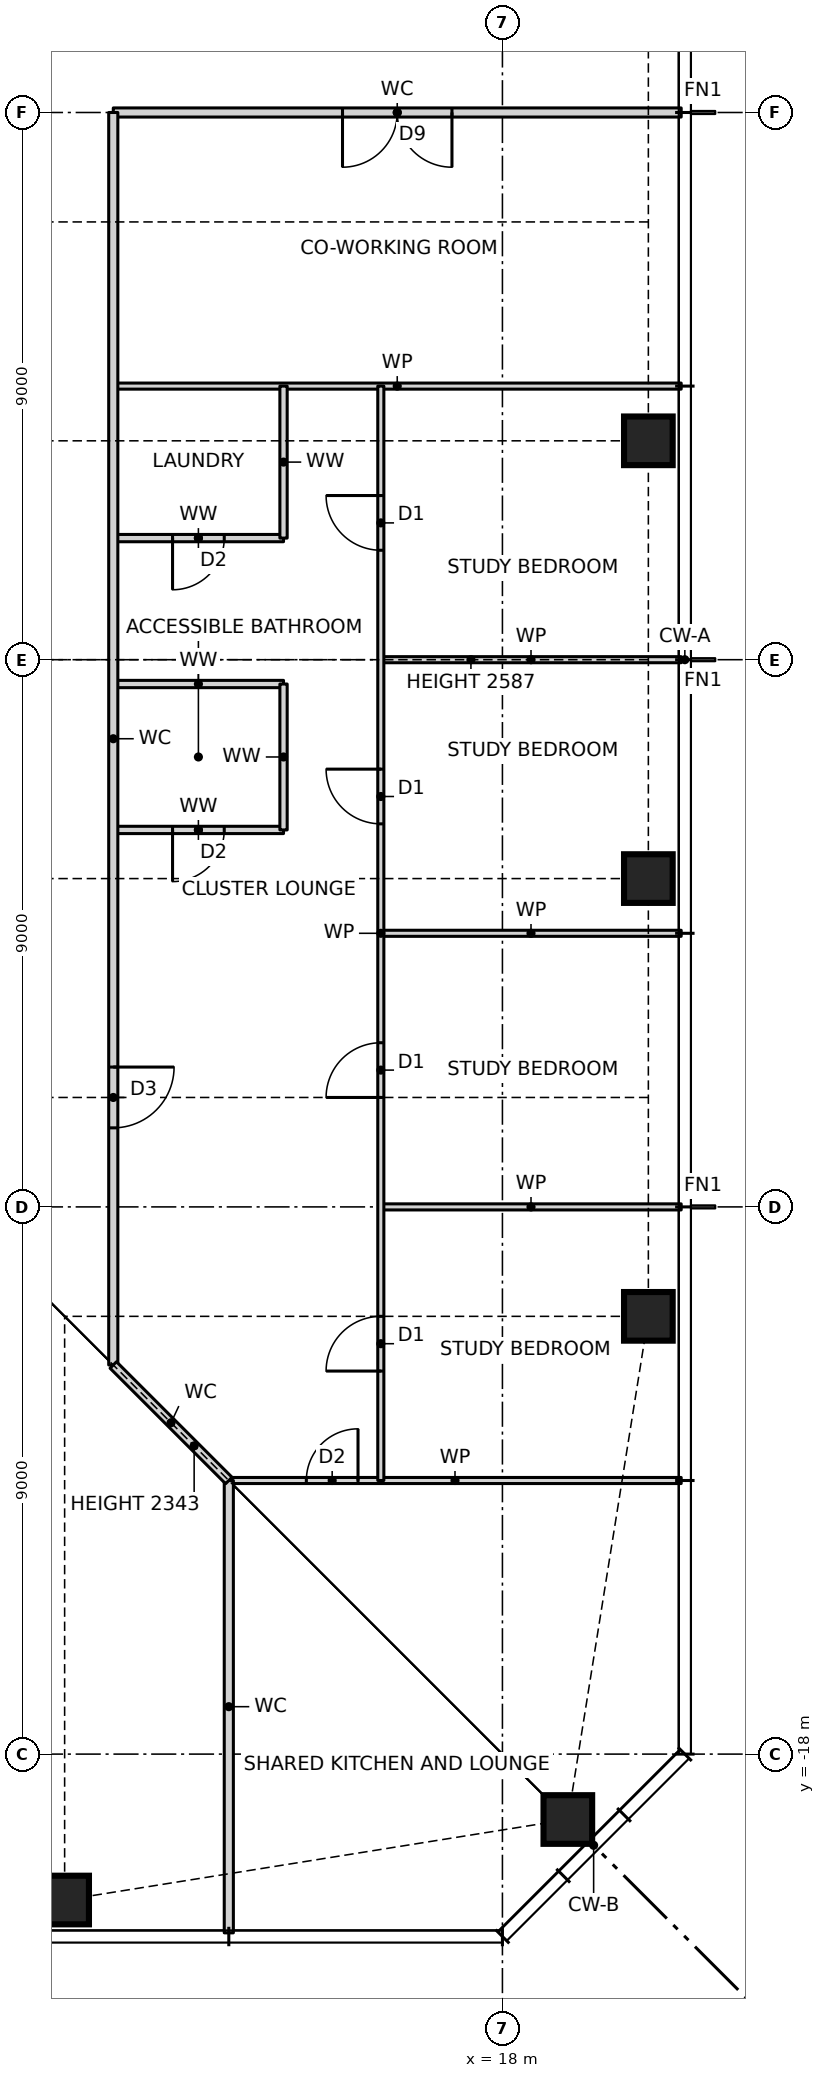
"""IFC4 building model, lengths in metres.
Left out: names, types, materials, properties, quantities, classifications, styles, units other than length and angle.
Written with IfcOpenShell. Run it as: python <this file> out.ifc"""

import sys

from ifc_helpers import new_model, si_unit, direction, frame, frame_2d, origin, origin_2d, place, context, subcontext, project, spatial, rectangle, hollow_rectangle, extrude, element, fill, save


model = new_model("IFC4")
c1 = context("Model", 3, precision=1e-05, world=origin(), true_north=direction((0.0, 1.0)))
c2 = subcontext(c1, "Body", "Model", "MODEL_VIEW")
j1 = project(units=[si_unit("LENGTHUNIT", "METRE"), si_unit("PLANEANGLEUNIT", "RADIAN")], contexts=[c1])
p1 = place(None, origin())
s1 = spatial("IfcSite", under=j1, at=p1, CompositionType="ELEMENT")
p2 = place(p1, origin())
s2 = spatial("IfcBuilding", under=s1, at=p2, CompositionType="ELEMENT")
p3 = place(p2, frame((0.0, 0.0, 115.5)))
s3 = spatial("IfcBuildingStorey", under=s2, at=p3, CompositionType="ELEMENT", Elevation=115.5)
for number, where, z_axis, x_axis in (
    (1, (10.8, -20.4, 0.0), (0.0, 0.0, 1.0), (1.0, 0.0, 0.0)),
    (2, (19.076, -19.076, 0.0), (0.0, 0.0, 1.0), (1.0, 0.0, 0.0)),
    (3, (20.4, -10.8, 0.0), (0.0, 0.0, 1.0), (1.0, 0.0, 0.0)),
    (4, (20.4, -3.6, 0.0), (0.0, 0.0, 1.0), (1.0, 0.0, 0.0)),
    (5, (20.4, 3.6, 0.0), (0.0, 0.0, 1.0), (1.0, 0.0, 0.0)),
):
    element("IfcColumn", number, at=place(p3, frame(where, z_axis=z_axis, x_axis=x_axis)), inside=s3, PredefinedType="COLUMN", context=c2, shape_type="SweptSolid", body=[
        extrude(hollow_rectangle(XDim=0.8, YDim=0.8, WallThickness=0.07, at=origin_2d()), origin(), (0.0, 0.0, 1.0), 3.5),
    ])
p4 = place(p3, frame((13.5, -13.5, 0.0), z_axis=(0.0, 0.0, 1.0), x_axis=(1.0, 0.0, 0.0)))
e6 = element("IfcWall", 6, at=p4, inside=s3, PredefinedType="PARTITIONING", context=c2, shape_type="SweptSolid", body=[
    extrude(rectangle(XDim=7.44, YDim=0.1, at=frame_2d((3.72, 0.0))), origin(), (0.0, 0.0, 1.0), 3.27),
])
p5 = place(p4, frame((1.275, 0.0, 0.0)))
e7 = element("IfcOpeningElement", 7, at=p5, cuts=e6, PredefinedType="OPENING", context=c2, shape_type="SweptSolid", body=[
    extrude(rectangle(XDim=0.85, YDim=2.1, at=frame_2d((0.425, 1.05))), frame((0.0, 0.06, 0.0), z_axis=(0.0, -1.0, 0.0), x_axis=(1.0, 0.0, 0.0)), (0.0, 0.0, 1.0), 0.12),
])
for number, where, z_axis, x_axis in (
    (8, (16.0, -9.0, 0.0), (0.0, 0.0, 1.0), (1.0, 0.0, 0.0)),
    (9, (16.0, -4.5, 0.0), (0.0, 0.0, 1.0), (1.0, 0.0, 0.0)),
):
    element("IfcWall", number, at=place(p3, frame(where, z_axis=z_axis, x_axis=x_axis)), inside=s3, PredefinedType="PARTITIONING", context=c2, shape_type="SweptSolid", body=[
        extrude(rectangle(XDim=4.94, YDim=0.1, at=frame_2d((2.47, 0.0))), origin(), (0.0, 0.0, 1.0), 3.27),
    ])
p6 = place(p3, frame((11.6, -2.8, 0.0), z_axis=(0.0, 0.0, 1.0), x_axis=(1.0, 0.0, 0.0)))
e10 = element("IfcWall", 10, at=p6, inside=s3, PredefinedType="PARTITIONING", context=c2, shape_type="SweptSolid", body=[
    extrude(rectangle(XDim=2.8, YDim=0.12, at=frame_2d((1.4, 0.0))), origin(), (0.0, 0.0, 1.0), 3.27),
])
p7 = place(p6, frame((0.975, 0.0, 0.0)))
e11 = element("IfcOpeningElement", 11, at=p7, cuts=e10, PredefinedType="OPENING", context=c2, shape_type="SweptSolid", body=[
    extrude(rectangle(XDim=0.85, YDim=2.1, at=frame_2d((0.425, 1.05))), frame((0.0, 0.07, 0.0), z_axis=(0.0, -1.0, 0.0), x_axis=(1.0, 0.0, 0.0)), (0.0, 0.0, 1.0), 0.14),
])
p8 = place(p3, frame((11.6, -0.4, 0.0), z_axis=(0.0, 0.0, 1.0), x_axis=(1.0, 0.0, 0.0)))
e12 = element("IfcWall", 12, at=p8, inside=s3, PredefinedType="PARTITIONING", context=c2, shape_type="SweptSolid", body=[
    extrude(rectangle(XDim=2.8, YDim=0.12, at=frame_2d((1.4, 0.0))), origin(), (0.0, 0.0, 1.0), 3.27),
])
p9 = place(p3, frame((16.0, 0.0, 0.0), z_axis=(0.0, 0.0, 1.0), x_axis=(1.0, 0.0, 0.0)))
e13 = element("IfcWall", 13, at=p9, inside=s3, PredefinedType="PARTITIONING", context=c2, shape_type="SweptSolid", body=[
    extrude(rectangle(XDim=4.94, YDim=0.1, at=frame_2d((2.47, 0.0))), origin(), (0.0, 0.0, 1.0), 2.587),
])
p10 = place(p3, frame((11.6, 2.0, 0.0), z_axis=(0.0, 0.0, 1.0), x_axis=(1.0, 0.0, 0.0)))
e14 = element("IfcWall", 14, at=p10, inside=s3, PredefinedType="PARTITIONING", context=c2, shape_type="SweptSolid", body=[
    extrude(rectangle(XDim=2.8, YDim=0.12, at=frame_2d((1.4, 0.0))), origin(), (0.0, 0.0, 1.0), 3.27),
])
p11 = place(p10, frame((0.975, 0.0, 0.0)))
e15 = element("IfcOpeningElement", 15, at=p11, cuts=e14, PredefinedType="OPENING", context=c2, shape_type="SweptSolid", body=[
    extrude(rectangle(XDim=0.85, YDim=2.1, at=frame_2d((0.425, 1.05))), frame((0.0, 0.07, 0.0), z_axis=(0.0, -1.0, 0.0), x_axis=(1.0, 0.0, 0.0)), (0.0, 0.0, 1.0), 0.14),
])
p12 = place(p3, frame((11.6, 4.5, 0.0), z_axis=(0.0, 0.0, 1.0), x_axis=(1.0, 0.0, 0.0)))
e16 = element("IfcWall", 16, at=p12, inside=s3, PredefinedType="PARTITIONING", context=c2, shape_type="SweptSolid", body=[
    extrude(rectangle(XDim=9.34, YDim=0.1, at=frame_2d((4.67, 0.0))), origin(), (0.0, 0.0, 1.0), 3.27),
])
p13 = place(p3, frame((11.6, 9.0, 0.0), z_axis=(0.0, 0.0, 1.0), x_axis=(1.0, 0.0, 0.0)))
e17 = element("IfcWall", 17, at=p13, inside=s3, PredefinedType="PARTITIONING", context=c2, shape_type="SweptSolid", body=[
    extrude(rectangle(XDim=9.34, YDim=0.15, at=frame_2d((4.67, 0.0))), origin(), (0.0, 0.0, 1.0), 3.27),
])
p14 = place(p13, frame((3.77, 0.0, 0.0)))
e18 = element("IfcOpeningElement", 18, at=p14, cuts=e17, PredefinedType="OPENING", context=c2, shape_type="SweptSolid", body=[
    extrude(rectangle(XDim=1.8, YDim=2.1, at=frame_2d((0.9, 1.05))), frame((0.0, 0.085, 0.0), z_axis=(0.0, -1.0, 0.0), x_axis=(1.0, 0.0, 0.0)), (0.0, 0.0, 1.0), 0.17),
])
p15 = place(p3, frame((16.0, -13.5, 0.0), z_axis=(0.0, 0.0, 1.0), x_axis=(0.0, 1.0, 0.0)))
e19 = element("IfcWall", 19, at=p15, inside=s3, PredefinedType="PARTITIONING", context=c2, shape_type="SweptSolid", body=[
    extrude(rectangle(XDim=18.0, YDim=0.1, at=frame_2d((9.0, 0.0))), origin(), (0.0, 0.0, 1.0), 3.27),
])
p16 = place(p15, frame((1.8, 0.0, 0.0)))
e20 = element("IfcOpeningElement", 20, at=p16, cuts=e19, PredefinedType="OPENING", context=c2, shape_type="SweptSolid", body=[
    extrude(rectangle(XDim=0.9, YDim=2.1, at=frame_2d((0.45, 1.05))), frame((0.0, 0.06, 0.0), z_axis=(0.0, -1.0, 0.0), x_axis=(1.0, 0.0, 0.0)), (0.0, 0.0, 1.0), 0.12),
])
p17 = place(p15, frame((6.3, 0.0, 0.0)))
e21 = element("IfcOpeningElement", 21, at=p17, cuts=e19, PredefinedType="OPENING", context=c2, shape_type="SweptSolid", body=[
    extrude(rectangle(XDim=0.9, YDim=2.1, at=frame_2d((0.45, 1.05))), frame((0.0, 0.06, 0.0), z_axis=(0.0, -1.0, 0.0), x_axis=(1.0, 0.0, 0.0)), (0.0, 0.0, 1.0), 0.12),
])
p18 = place(p15, frame((10.8, 0.0, 0.0)))
e22 = element("IfcOpeningElement", 22, at=p18, cuts=e19, PredefinedType="OPENING", context=c2, shape_type="SweptSolid", body=[
    extrude(rectangle(XDim=0.9, YDim=2.1, at=frame_2d((0.45, 1.05))), frame((0.0, 0.06, 0.0), z_axis=(0.0, -1.0, 0.0), x_axis=(1.0, 0.0, 0.0)), (0.0, 0.0, 1.0), 0.12),
])
p19 = place(p15, frame((15.3, 0.0, 0.0)))
e23 = element("IfcOpeningElement", 23, at=p19, cuts=e19, PredefinedType="OPENING", context=c2, shape_type="SweptSolid", body=[
    extrude(rectangle(XDim=0.9, YDim=2.1, at=frame_2d((0.45, 1.05))), frame((0.0, 0.06, 0.0), z_axis=(0.0, -1.0, 0.0), x_axis=(1.0, 0.0, 0.0)), (0.0, 0.0, 1.0), 0.12),
])
p20 = place(p3, frame((14.4, -2.8, 0.0), z_axis=(0.0, 0.0, 1.0), x_axis=(0.0, 1.0, 0.0)))
e24 = element("IfcWall", 24, at=p20, inside=s3, PredefinedType="PARTITIONING", context=c2, shape_type="SweptSolid", body=[
    extrude(rectangle(XDim=2.4, YDim=0.12, at=frame_2d((1.2, 0.0))), origin(), (0.0, 0.0, 1.0), 3.27),
])
p21 = place(p3, frame((14.4, 2.0, 0.0), z_axis=(0.0, 0.0, 1.0), x_axis=(0.0, 1.0, 0.0)))
e25 = element("IfcWall", 25, at=p21, inside=s3, PredefinedType="PARTITIONING", context=c2, shape_type="SweptSolid", body=[
    extrude(rectangle(XDim=2.5, YDim=0.12, at=frame_2d((1.25, 0.0))), origin(), (0.0, 0.0, 1.0), 3.27),
])
p22 = place(p3, frame((13.5, -20.94, 0.0), z_axis=(0.0, 0.0, 1.0), x_axis=(0.0, 1.0, 0.0)))
e26 = element("IfcWall", 26, at=p22, inside=s3, PredefinedType="PARTITIONING", context=c2, shape_type="SweptSolid", body=[
    extrude(rectangle(XDim=7.44, YDim=0.15, at=frame_2d((3.72, 0.0))), origin(), (0.0, 0.0, 1.0), 3.27),
])
p23 = place(p3, frame((11.6, -11.6, 0.0), z_axis=(0.0, 0.0, 1.0), x_axis=(0.0, 1.0, 0.0)))
e27 = element("IfcWall", 27, at=p23, inside=s3, PredefinedType="PARTITIONING", context=c2, shape_type="SweptSolid", body=[
    extrude(rectangle(XDim=20.6, YDim=0.15, at=frame_2d((10.3, 0.0))), origin(), (0.0, 0.0, 1.0), 3.27),
])
p24 = place(p23, frame((3.9, 0.0, 0.0)))
e28 = element("IfcOpeningElement", 28, at=p24, cuts=e27, PredefinedType="OPENING", context=c2, shape_type="SweptSolid", body=[
    extrude(rectangle(XDim=1.0, YDim=2.1, at=frame_2d((0.5, 1.05))), frame((0.0, 0.085, 0.0), z_axis=(0.0, -1.0, 0.0), x_axis=(1.0, 0.0, 0.0)), (0.0, 0.0, 1.0), 0.17),
])
p25 = place(p3, frame((13.5, -13.5, 0.0), z_axis=(0.0, 0.0, 1.0), x_axis=(-0.707106781187, 0.707106781187, 0.0)))
e29 = element("IfcWall", 29, at=p25, inside=s3, PredefinedType="PARTITIONING", context=c2, shape_type="SweptSolid", body=[
    extrude(rectangle(XDim=2.687, YDim=0.15, at=frame_2d((1.343, 0.0))), origin(), (0.0, 0.0, 1.0), 2.343),
])
p26 = place(p16, origin())
e30 = element("IfcDoor", 30, at=p26, inside=s3, OperationType="SINGLE_SWING_LEFT", PredefinedType="DOOR", context=c2, shape_type="SweptSolid", body=[
    extrude(rectangle(XDim=0.9, YDim=2.1, at=frame_2d((0.45, 1.05))), frame((0.0, 0.025, 0.0), z_axis=(0.0, -1.0, 0.0), x_axis=(1.0, 0.0, 0.0)), (0.0, 0.0, 1.0), 0.05),
])
fill(e20, e30)
p27 = place(p17, origin())
e31 = element("IfcDoor", 31, at=p27, inside=s3, OperationType="SINGLE_SWING_LEFT", PredefinedType="DOOR", context=c2, shape_type="SweptSolid", body=[
    extrude(rectangle(XDim=0.9, YDim=2.1, at=frame_2d((0.45, 1.05))), frame((0.0, 0.025, 0.0), z_axis=(0.0, -1.0, 0.0), x_axis=(1.0, 0.0, 0.0)), (0.0, 0.0, 1.0), 0.05),
])
fill(e21, e31)
p28 = place(p18, origin())
e32 = element("IfcDoor", 32, at=p28, inside=s3, OperationType="SINGLE_SWING_RIGHT", PredefinedType="DOOR", context=c2, shape_type="SweptSolid", body=[
    extrude(rectangle(XDim=0.9, YDim=2.1, at=frame_2d((0.45, 1.05))), frame((0.0, 0.025, 0.0), z_axis=(0.0, -1.0, 0.0), x_axis=(1.0, 0.0, 0.0)), (0.0, 0.0, 1.0), 0.05),
])
fill(e22, e32)
p29 = place(p19, origin())
e33 = element("IfcDoor", 33, at=p29, inside=s3, OperationType="SINGLE_SWING_RIGHT", PredefinedType="DOOR", context=c2, shape_type="SweptSolid", body=[
    extrude(rectangle(XDim=0.9, YDim=2.1, at=frame_2d((0.45, 1.05))), frame((0.0, 0.025, 0.0), z_axis=(0.0, -1.0, 0.0), x_axis=(1.0, 0.0, 0.0)), (0.0, 0.0, 1.0), 0.05),
])
fill(e23, e33)
p30 = place(p24, frame((1.0, 0.0, 0.0), z_axis=(0.0, 0.0, 1.0), x_axis=(-1.0, 0.0, 0.0)))
e34 = element("IfcDoor", 34, at=p30, inside=s3, OperationType="SINGLE_SWING_LEFT", PredefinedType="DOOR", context=c2, shape_type="SweptSolid", body=[
    extrude(rectangle(XDim=1.0, YDim=2.1, at=frame_2d((0.5, 1.05))), frame((0.0, 0.025, 0.0), z_axis=(0.0, -1.0, 0.0), x_axis=(1.0, 0.0, 0.0)), (0.0, 0.0, 1.0), 0.05),
])
fill(e28, e34)
p31 = place(p7, frame((0.85, 0.0, 0.0), z_axis=(0.0, 0.0, 1.0), x_axis=(-1.0, 0.0, 0.0)))
e35 = element("IfcDoor", 35, at=p31, inside=s3, OperationType="SINGLE_SWING_RIGHT", PredefinedType="DOOR", context=c2, shape_type="SweptSolid", body=[
    extrude(rectangle(XDim=0.85, YDim=2.1, at=frame_2d((0.425, 1.05))), frame((0.0, 0.025, 0.0), z_axis=(0.0, -1.0, 0.0), x_axis=(1.0, 0.0, 0.0)), (0.0, 0.0, 1.0), 0.05),
])
fill(e11, e35)
p32 = place(p11, frame((0.85, 0.0, 0.0), z_axis=(0.0, 0.0, 1.0), x_axis=(-1.0, 0.0, 0.0)))
e36 = element("IfcDoor", 36, at=p32, inside=s3, OperationType="SINGLE_SWING_RIGHT", PredefinedType="DOOR", context=c2, shape_type="SweptSolid", body=[
    extrude(rectangle(XDim=0.85, YDim=2.1, at=frame_2d((0.425, 1.05))), frame((0.0, 0.025, 0.0), z_axis=(0.0, -1.0, 0.0), x_axis=(1.0, 0.0, 0.0)), (0.0, 0.0, 1.0), 0.05),
])
fill(e15, e36)
p33 = place(p14, frame((1.8, 0.0, 0.0), z_axis=(0.0, 0.0, 1.0), x_axis=(-1.0, 0.0, 0.0)))
e37 = element("IfcDoor", 37, at=p33, inside=s3, OperationType="DOUBLE_DOOR_SINGLE_SWING", PredefinedType="DOOR", context=c2, shape_type="SweptSolid", body=[
    extrude(rectangle(XDim=1.8, YDim=2.1, at=frame_2d((0.9, 1.05))), frame((0.0, 0.025, 0.0), z_axis=(0.0, -1.0, 0.0), x_axis=(1.0, 0.0, 0.0)), (0.0, 0.0, 1.0), 0.05),
])
fill(e18, e37)
p34 = place(p5, origin())
e38 = element("IfcDoor", 38, at=p34, inside=s3, OperationType="SINGLE_SWING_RIGHT", PredefinedType="DOOR", context=c2, shape_type="SweptSolid", body=[
    extrude(rectangle(XDim=0.85, YDim=2.1, at=frame_2d((0.425, 1.05))), frame((0.0, 0.025, 0.0), z_axis=(0.0, -1.0, 0.0), x_axis=(1.0, 0.0, 0.0)), (0.0, 0.0, 1.0), 0.05),
])
fill(e7, e38)
save(model, sys.argv[1])
